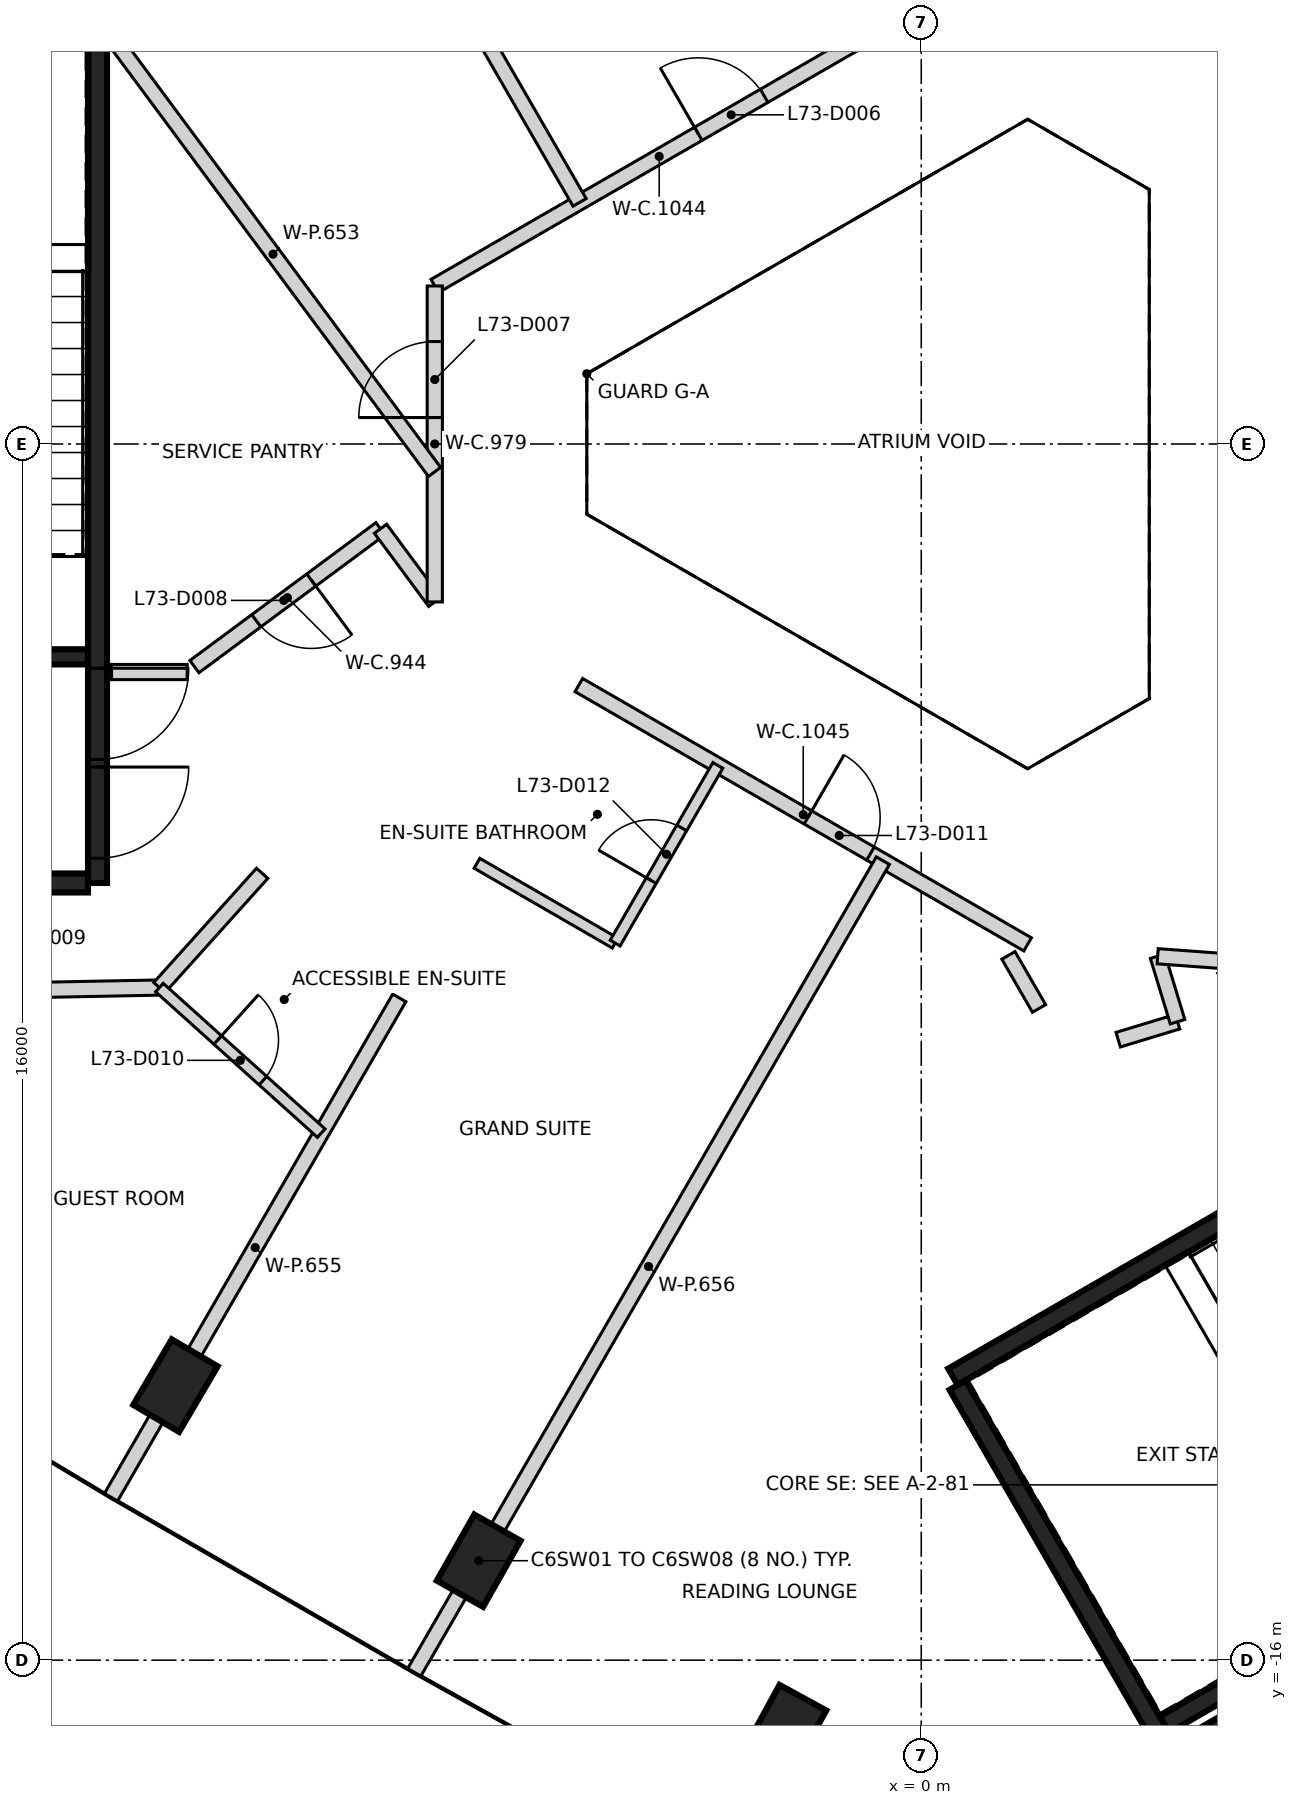
"""IFC4 building model, lengths in metres.
Left out: names, types, materials, properties, quantities, classifications, styles, units other than length and angle.
Written with IfcOpenShell. Run it as: python <this file> out.ifc"""

import sys

from ifc_helpers import new_model, si_unit, direction, frame, frame_2d, origin, origin_2d, place, context, subcontext, project, spatial, rectangle, extrude, element, fill, save


model = new_model("IFC4")
c1 = context("Model", 3, precision=1e-05, world=origin(), true_north=direction((0.0, 1.0)))
c2 = subcontext(c1, "Body", "Model", "MODEL_VIEW")
j1 = project(units=[si_unit("LENGTHUNIT", "METRE"), si_unit("PLANEANGLEUNIT", "RADIAN")], contexts=[c1])
p1 = place(None, origin())
s1 = spatial("IfcSite", under=j1, at=p1, CompositionType="ELEMENT")
p2 = place(p1, origin())
s2 = spatial("IfcBuilding", under=s1, at=p2, CompositionType="ELEMENT")
p3 = place(p2, frame((0.0, 0.0, 291.0)))
s3 = spatial("IfcBuildingStorey", under=s2, at=p3, CompositionType="ELEMENT", Elevation=291.0)
for number, where, z_axis, x_axis in (
    (1, (-9.812, -12.388, -0.35), (0.0, 0.0, 1.0), (0.507, 0.862, 0.0)),
    (2, (-5.822, -14.691, -0.35), (0.0, 0.0, 1.0), (0.493, 0.87, 0.0)),
    (3, (-1.797, -16.932, -0.35), (0.0, 0.0, 1.0), (0.479, 0.878, 0.0)),
):
    element("IfcColumn", number, at=place(p3, frame(where, z_axis=z_axis, x_axis=x_axis)), inside=s3, PredefinedType="COLUMN", context=c2, shape_type="SweptSolid", body=[
        extrude(rectangle(XDim=1.0, YDim=0.7, at=origin_2d()), origin(), (0.0, 0.0, 1.0), 3.6),
    ])
p4 = place(p3, frame((-10.837, 5.775, 0.0), z_axis=(0.0, 0.0, 1.0), x_axis=(0.0, -1.0, 0.0)))
e4 = element("IfcWall", 4, at=p4, inside=s3, PredefinedType="SHEAR", context=c2, shape_type="SweptSolid", body=[
    extrude(rectangle(XDim=11.55, YDim=0.25, at=frame_2d((5.775, 0.0))), origin(), (0.0, 0.0, 1.0), 3.25),
])
p5 = place(p4, frame((10.025, 0.0, 0.0)))
e5 = element("IfcOpeningElement", 5, at=p5, cuts=e4, PredefinedType="OPENING", context=c2, shape_type="SweptSolid", body=[
    extrude(rectangle(XDim=1.2, YDim=2.1, at=frame_2d((0.6, 1.05))), frame((0.0, 0.135, 0.0), z_axis=(0.0, -1.0, 0.0), x_axis=(1.0, 0.0, 0.0)), (0.0, 0.0, 1.0), 0.27),
])
p6 = place(p4, frame((8.725, 0.0, 0.0)))
e6 = element("IfcOpeningElement", 6, at=p6, cuts=e4, PredefinedType="OPENING", context=c2, shape_type="SweptSolid", body=[
    extrude(rectangle(XDim=1.2, YDim=2.1, at=frame_2d((0.6, 1.05))), frame((0.0, 0.135, 0.0), z_axis=(0.0, -1.0, 0.0), x_axis=(1.0, 0.0, 0.0)), (0.0, 0.0, 1.0), 0.27),
])
p7 = place(p3, frame((-10.963, -5.775, 0.0), z_axis=(0.0, 0.0, 1.0), x_axis=(-1.0, 0.0, 0.0)))
e7 = element("IfcWall", 7, at=p7, inside=s3, PredefinedType="SHEAR", context=c2, shape_type="SweptSolid", body=[
    extrude(rectangle(XDim=5.225, YDim=0.25, at=frame_2d((2.612, 0.0))), origin(), (0.0, 0.0, 1.0), 3.25),
])
p8 = place(p3, frame((-10.963, -2.8, 0.0), z_axis=(0.0, 0.0, 1.0), x_axis=(-1.0, 0.0, 0.0)))
e8 = element("IfcWall", 8, at=p8, inside=s3, PredefinedType="SHEAR", context=c2, shape_type="SweptSolid", body=[
    extrude(rectangle(XDim=5.098, YDim=0.2, at=frame_2d((2.549, 0.0))), origin(), (0.0, 0.0, 1.0), 3.25),
])
p9 = place(p8, frame((1.774, 0.0, 0.0)))
e9 = element("IfcOpeningElement", 9, at=p9, cuts=e8, PredefinedType="OPENING", context=c2, shape_type="SweptSolid", body=[
    extrude(rectangle(XDim=1.4, YDim=2.1, at=frame_2d((0.7, 1.05))), frame((0.0, 0.11, 0.0), z_axis=(0.0, -1.0, 0.0), x_axis=(1.0, 0.0, 0.0)), (0.0, 0.0, 1.0), 0.22),
])
p10 = place(p3, frame((0.417, -12.273, 0.0), z_axis=(0.0, 0.0, 1.0), x_axis=(0.866021906294, 0.500006057782, 0.0)))
e10 = element("IfcWall", 10, at=p10, inside=s3, PredefinedType="SHEAR", context=c2, shape_type="SweptSolid", body=[
    extrude(rectangle(XDim=11.55, YDim=0.25, at=frame_2d((5.775, 0.0))), origin(), (0.0, 0.0, 1.0), 3.25),
])
p11 = place(p10, frame((10.025, 0.0, 0.0)))
e11 = element("IfcOpeningElement", 11, at=p11, cuts=e10, PredefinedType="OPENING", context=c2, shape_type="SweptSolid", body=[
    extrude(rectangle(XDim=1.2, YDim=2.1, at=frame_2d((0.6, 1.05))), frame((0.0, 0.135, 0.0), z_axis=(0.0, -1.0, 0.0), x_axis=(1.0, 0.0, 0.0)), (0.0, 0.0, 1.0), 0.27),
])
p12 = place(p10, frame((8.725, 0.0, 0.0)))
e12 = element("IfcOpeningElement", 12, at=p12, cuts=e10, PredefinedType="OPENING", context=c2, shape_type="SweptSolid", body=[
    extrude(rectangle(XDim=1.2, YDim=2.1, at=frame_2d((0.6, 1.05))), frame((0.0, 0.135, 0.0), z_axis=(0.0, -1.0, 0.0), x_axis=(1.0, 0.0, 0.0)), (0.0, 0.0, 1.0), 0.27),
])
p13 = place(p3, frame((3.235, -17.153, 0.0), z_axis=(0.0, 0.0, 1.0), x_axis=(-0.500008851346, 0.866020293397, 0.0)))
e13 = element("IfcWall", 13, at=p13, inside=s3, PredefinedType="SHEAR", context=c2, shape_type="SweptSolid", body=[
    extrude(rectangle(XDim=5.51, YDim=0.25, at=frame_2d((2.755, 0.0))), origin(), (0.0, 0.0, 1.0), 3.25),
])
p14 = place(p3, frame((1.669, -18.19, 0.0), z_axis=(0.0, 0.0, 1.0), x_axis=(0.866042235819, 0.499970844928, 0.0)))
e14 = element("IfcWall", 14, at=p14, inside=s3, PredefinedType="SHEAR", context=c2, shape_type="SweptSolid", body=[
    extrude(rectangle(XDim=2.865, YDim=0.25, at=frame_2d((1.432, 0.0))), origin(), (0.0, 0.0, 1.0), 3.25),
])
p15 = place(p3, frame((5.431, -15.556, 0.0), z_axis=(0.0, 0.0, 1.0), x_axis=(-0.866022940537, -0.500004266446, 0.0)))
e15 = element("IfcWall", 15, at=p15, inside=s3, PredefinedType="SHEAR", context=c2, shape_type="SweptSolid", body=[
    extrude(rectangle(XDim=2.575, YDim=0.25, at=frame_2d((1.287, 0.0))), origin(), (0.0, 0.0, 1.0), 3.25),
])
p16 = place(p3, frame((-16.732, -7.282, 0.0), z_axis=(0.0, 0.0, 1.0), x_axis=(0.999809119854, 0.019537754635, 0.0)))
e16 = element("IfcWall", 16, at=p16, inside=s3, PredefinedType="PARTITIONING", context=c2, shape_type="SweptSolid", body=[
    extrude(rectangle(XDim=6.71, YDim=0.2, at=frame_2d((3.355, 0.0))), origin(), (0.0, 0.0, 1.0), 3.25),
])
p17 = place(p16, frame((3.451, 0.0, 0.0)))
e17 = element("IfcOpeningElement", 17, at=p17, cuts=e16, PredefinedType="OPENING", context=c2, shape_type="SweptSolid", body=[
    extrude(rectangle(XDim=1.0, YDim=2.1, at=frame_2d((0.5, 1.05))), frame((0.0, 0.11, 0.0), z_axis=(0.0, -1.0, 0.0), x_axis=(1.0, 0.0, 0.0)), (0.0, 0.0, 1.0), 0.22),
])
p18 = place(p3, frame((-10.652, -3.0, 0.0), z_axis=(0.0, 0.0, 1.0), x_axis=(1.0, 0.0, 0.0)))
e18 = element("IfcWall", 18, at=p18, inside=s3, PredefinedType="PARTITIONING", context=c2, shape_type="SweptSolid", body=[
    extrude(rectangle(XDim=0.994, YDim=0.2, at=frame_2d((0.497, 0.0))), origin(), (0.0, 0.0, 1.0), 3.25),
])
p19 = place(p3, frame((-10.023, -7.151, 0.0), z_axis=(0.0, 0.0, 1.0), x_axis=(0.668804583793, 0.743438248073, 0.0)))
e19 = element("IfcWall", 19, at=p19, inside=s3, PredefinedType="PARTITIONING", context=c2, shape_type="SweptSolid", body=[
    extrude(rectangle(XDim=2.021, YDim=0.2, at=frame_2d((1.011, 0.0))), origin(), (0.0, 0.0, 1.0), 3.25),
])
p20 = place(p3, frame((-7.115, -1.115, 0.0), z_axis=(0.0, 0.0, 1.0), x_axis=(-0.803344165632, -0.595515030495, 0.0)))
e20 = element("IfcWall", 20, at=p20, inside=s3, PredefinedType="PARTITIONING", context=c2, shape_type="SweptSolid", body=[
    extrude(rectangle(XDim=3.046, YDim=0.2, at=frame_2d((1.523, 0.0))), origin(), (0.0, 0.0, 1.0), 3.25),
])
p21 = place(p20, frame((1.133, 0.0, 0.0)))
e21 = element("IfcOpeningElement", 21, at=p21, cuts=e20, PredefinedType="OPENING", context=c2, shape_type="SweptSolid", body=[
    extrude(rectangle(XDim=0.9, YDim=2.1, at=frame_2d((0.45, 1.05))), frame((0.0, 0.11, 0.0), z_axis=(0.0, -1.0, 0.0), x_axis=(1.0, 0.0, 0.0)), (0.0, 0.0, 1.0), 0.22),
])
p22 = place(p3, frame((-7.114, -1.115, 0.0), z_axis=(0.0, 0.0, 1.0), x_axis=(0.595690139668, -0.803214328496, 0.0)))
e22 = element("IfcWall", 22, at=p22, inside=s3, PredefinedType="PARTITIONING", context=c2, shape_type="SweptSolid", body=[
    extrude(rectangle(XDim=1.199, YDim=0.2, at=frame_2d((0.599, 0.0))), origin(), (0.0, 0.0, 1.0), 3.25),
])
p23 = place(p3, frame((-6.4, 2.079, 0.0), z_axis=(0.0, 0.0, 1.0), x_axis=(0.866037708501, 0.499978687001, 0.0)))
e23 = element("IfcWall", 23, at=p23, inside=s3, PredefinedType="PARTITIONING", context=c2, shape_type="SweptSolid", body=[
    extrude(rectangle(XDim=6.818, YDim=0.2, at=frame_2d((3.409, 0.0))), origin(), (0.0, 0.0, 1.0), 3.25),
])
p24 = place(p23, frame((4.003, 0.0, 0.0)))
e24 = element("IfcOpeningElement", 24, at=p24, cuts=e23, PredefinedType="OPENING", context=c2, shape_type="SweptSolid", body=[
    extrude(rectangle(XDim=1.0, YDim=2.1, at=frame_2d((0.5, 1.05))), frame((0.0, 0.11, 0.0), z_axis=(0.0, -1.0, 0.0), x_axis=(1.0, 0.0, 0.0)), (0.0, 0.0, 1.0), 0.22),
])
p25 = place(p3, frame((-6.4, -2.078, 0.0), z_axis=(0.0, 0.0, 1.0), x_axis=(0.0, 1.0, 0.0)))
e25 = element("IfcWall", 25, at=p25, inside=s3, PredefinedType="PARTITIONING", context=c2, shape_type="SweptSolid", body=[
    extrude(rectangle(XDim=4.157, YDim=0.2, at=frame_2d((2.079, 0.0))), origin(), (0.0, 0.0, 1.0), 3.25),
])
p26 = place(p25, frame((2.426, 0.0, 0.0)))
e26 = element("IfcOpeningElement", 26, at=p26, cuts=e25, PredefinedType="OPENING", context=c2, shape_type="SweptSolid", body=[
    extrude(rectangle(XDim=1.0, YDim=2.1, at=frame_2d((0.5, 1.05))), frame((0.0, 0.11, 0.0), z_axis=(0.0, -1.0, 0.0), x_axis=(1.0, 0.0, 0.0)), (0.0, 0.0, 1.0), 0.22),
])
p27 = place(p3, frame((-4.505, -3.171, 0.0), z_axis=(0.0, 0.0, 1.0), x_axis=(0.865849219471, -0.500305036094, 0.0)))
e27 = element("IfcWall", 27, at=p27, inside=s3, PredefinedType="PARTITIONING", context=c2, shape_type="SweptSolid", body=[
    extrude(rectangle(XDim=6.819, YDim=0.2, at=frame_2d((3.41, 0.0))), origin(), (0.0, 0.0, 1.0), 3.25),
])
p28 = place(p27, frame((3.481, 0.0, 0.0)))
e28 = element("IfcOpeningElement", 28, at=p28, cuts=e27, PredefinedType="OPENING", context=c2, shape_type="SweptSolid", body=[
    extrude(rectangle(XDim=0.95, YDim=2.1, at=frame_2d((0.475, 1.05))), frame((0.0, 0.11, 0.0), z_axis=(0.0, -1.0, 0.0), x_axis=(1.0, 0.0, 0.0)), (0.0, 0.0, 1.0), 0.22),
])
p29 = place(p3, frame((1.147, -6.728, 0.0), z_axis=(0.0, 0.0, 1.0), x_axis=(0.500080775649, -0.865978762919, 0.0)))
e29 = element("IfcWall", 29, at=p29, inside=s3, PredefinedType="PARTITIONING", context=c2, shape_type="SweptSolid", body=[
    extrude(rectangle(XDim=0.806, YDim=0.2, at=frame_2d((0.403, 0.0))), origin(), (0.0, 0.0, 1.0), 3.25),
])
p30 = place(p3, frame((2.591, -7.837, 0.0), z_axis=(0.0, 0.0, 1.0), x_axis=(0.956974070788, 0.290173444409, 0.0)))
e30 = element("IfcWall", 30, at=p30, inside=s3, PredefinedType="PARTITIONING", context=c2, shape_type="SweptSolid", body=[
    extrude(rectangle(XDim=0.816, YDim=0.2, at=frame_2d((0.408, 0.0))), origin(), (0.0, 0.0, 1.0), 3.25),
])
p31 = place(p3, frame((3.11, -6.739, 0.0), z_axis=(0.0, 0.0, 1.0), x_axis=(0.291053676179, -0.95670672496, 0.0)))
e31 = element("IfcWall", 31, at=p31, inside=s3, PredefinedType="PARTITIONING", context=c2, shape_type="SweptSolid", body=[
    extrude(rectangle(XDim=0.9, YDim=0.2, at=frame_2d((0.45, 0.0))), origin(), (0.0, 0.0, 1.0), 3.25),
])
p32 = place(p3, frame((3.11, -6.739, 0.0), z_axis=(0.0, 0.0, 1.0), x_axis=(0.997306047238, -0.073352901386, 0.0)))
e32 = element("IfcWall", 32, at=p32, inside=s3, PredefinedType="PARTITIONING", context=c2, shape_type="SweptSolid", body=[
    extrude(rectangle(XDim=0.832, YDim=0.2, at=frame_2d((0.416, 0.0))), origin(), (0.0, 0.0, 1.0), 3.25),
])
p33 = place(p3, frame((-10.652, 5.364, 0.0), z_axis=(0.0, 0.0, 1.0), x_axis=(0.595550732464, -0.803317698711, 0.0)))
e33 = element("IfcWall", 33, at=p33, inside=s3, PredefinedType="PARTITIONING", context=c2, shape_type="SweptSolid", body=[
    extrude(rectangle(XDim=7.135, YDim=0.2, at=frame_2d((3.567, 0.0))), origin(), (0.0, 0.0, 1.0), 3.25),
])
p34 = place(p3, frame((-10.659, 13.856, 0.0), z_axis=(0.0, 0.0, 1.0), x_axis=(0.500004723409, -0.866022676706, 0.0)))
e34 = element("IfcWall", 34, at=p34, inside=s3, PredefinedType="PARTITIONING", context=c2, shape_type="SweptSolid", body=[
    extrude(rectangle(XDim=12.329, YDim=0.2, at=frame_2d((6.164, 0.0))), origin(), (0.0, 0.0, 1.0), 3.25),
])
p35 = place(p3, frame((-10.659, -13.856, 0.0), z_axis=(0.0, 0.0, 1.0), x_axis=(0.49995742368, 0.866049983839, 0.0)))
e35 = element("IfcWall", 35, at=p35, inside=s3, PredefinedType="PARTITIONING", context=c2, shape_type="SweptSolid", body=[
    extrude(rectangle(XDim=7.585, YDim=0.2, at=frame_2d((3.792, 0.0))), origin(), (0.0, 0.0, 1.0), 3.25),
])
p36 = place(p3, frame((-6.67, -16.159, 0.0), z_axis=(0.0, 0.0, 1.0), x_axis=(0.500017276951, 0.866015428702, 0.0)))
e36 = element("IfcWall", 36, at=p36, inside=s3, PredefinedType="PARTITIONING", context=c2, shape_type="SweptSolid", body=[
    extrude(rectangle(XDim=12.329, YDim=0.2, at=frame_2d((6.165, 0.0))), origin(), (0.0, 0.0, 1.0), 3.25),
])
p37 = place(p3, frame((-10.023, -7.151, 0.0), z_axis=(0.0, 0.0, 1.0), x_axis=(0.743463699468, -0.668776291127, 0.0)))
e37 = element("IfcWall", 37, at=p37, inside=s3, PredefinedType="PARTITIONING", context=c2, shape_type="SweptSolid", body=[
    extrude(rectangle(XDim=2.864, YDim=0.15, at=frame_2d((1.432, 0.0))), origin(), (0.0, 0.0, 1.0), 3.25),
])
p38 = place(p37, frame((1.032, 0.0, 0.0)))
e38 = element("IfcOpeningElement", 38, at=p38, cuts=e37, PredefinedType="OPENING", context=c2, shape_type="SweptSolid", body=[
    extrude(rectangle(XDim=0.8, YDim=2.1, at=frame_2d((0.4, 1.05))), frame((0.0, 0.085, 0.0), z_axis=(0.0, -1.0, 0.0), x_axis=(1.0, 0.0, 0.0)), (0.0, 0.0, 1.0), 0.17),
])
p39 = place(p3, frame((-5.845, -5.516, 0.0), z_axis=(0.0, 0.0, 1.0), x_axis=(0.865972526687, -0.500091574638, 0.0)))
e39 = element("IfcWall", 39, at=p39, inside=s3, PredefinedType="PARTITIONING", context=c2, shape_type="SweptSolid", body=[
    extrude(rectangle(XDim=2.099, YDim=0.15, at=frame_2d((1.05, 0.0))), origin(), (0.0, 0.0, 1.0), 3.25),
])
p40 = place(p3, frame((-4.027, -6.566, 0.0), z_axis=(0.0, 0.0, 1.0), x_axis=(0.500358939419, 0.865818070812, 0.0)))
e40 = element("IfcWall", 40, at=p40, inside=s3, PredefinedType="PARTITIONING", context=c2, shape_type="SweptSolid", body=[
    extrude(rectangle(XDim=2.7, YDim=0.15, at=frame_2d((1.35, 0.0))), origin(), (0.0, 0.0, 1.0), 3.25),
])
p41 = place(p40, frame((0.95, 0.0, 0.0)))
e41 = element("IfcOpeningElement", 41, at=p41, cuts=e40, PredefinedType="OPENING", context=c2, shape_type="SweptSolid", body=[
    extrude(rectangle(XDim=0.8, YDim=2.1, at=frame_2d((0.4, 1.05))), frame((0.0, 0.085, 0.0), z_axis=(0.0, -1.0, 0.0), x_axis=(1.0, 0.0, 0.0)), (0.0, 0.0, 1.0), 0.17),
])
p42 = place(p5, origin())
e42 = element("IfcDoor", 42, at=p42, inside=s3, OperationType="SINGLE_SWING_LEFT", PredefinedType="DOOR", context=c2, shape_type="SweptSolid", body=[
    extrude(rectangle(XDim=1.2, YDim=2.1, at=frame_2d((0.6, 1.05))), frame((0.0, 0.025, 0.0), z_axis=(0.0, -1.0, 0.0), x_axis=(1.0, 0.0, 0.0)), (0.0, 0.0, 1.0), 0.05),
])
fill(e5, e42)
p43 = place(p6, origin())
e43 = element("IfcDoor", 43, at=p43, inside=s3, OperationType="SINGLE_SWING_RIGHT", PredefinedType="DOOR", context=c2, shape_type="SweptSolid", body=[
    extrude(rectangle(XDim=1.2, YDim=2.1, at=frame_2d((0.6, 1.05))), frame((0.0, 0.025, 0.0), z_axis=(0.0, -1.0, 0.0), x_axis=(1.0, 0.0, 0.0)), (0.0, 0.0, 1.0), 0.05),
])
fill(e6, e43)
p44 = place(p24, origin())
e44 = element("IfcDoor", 44, at=p44, inside=s3, OperationType="SINGLE_SWING_LEFT", PredefinedType="DOOR", context=c2, shape_type="SweptSolid", body=[
    extrude(rectangle(XDim=1.0, YDim=2.1, at=frame_2d((0.5, 1.05))), frame((0.0, 0.025, 0.0), z_axis=(0.0, -1.0, 0.0), x_axis=(1.0, 0.0, 0.0)), (0.0, 0.0, 1.0), 0.05),
])
fill(e24, e44)
p45 = place(p26, origin())
e45 = element("IfcDoor", 45, at=p45, inside=s3, OperationType="SINGLE_SWING_LEFT", PredefinedType="DOOR", context=c2, shape_type="SweptSolid", body=[
    extrude(rectangle(XDim=1.0, YDim=2.1, at=frame_2d((0.5, 1.05))), frame((0.0, 0.025, 0.0), z_axis=(0.0, -1.0, 0.0), x_axis=(1.0, 0.0, 0.0)), (0.0, 0.0, 1.0), 0.05),
])
fill(e26, e45)
p46 = place(p21, origin())
e46 = element("IfcDoor", 46, at=p46, inside=s3, OperationType="SINGLE_SWING_LEFT", PredefinedType="DOOR", context=c2, shape_type="SweptSolid", body=[
    extrude(rectangle(XDim=0.9, YDim=2.1, at=frame_2d((0.45, 1.05))), frame((0.0, 0.025, 0.0), z_axis=(0.0, -1.0, 0.0), x_axis=(1.0, 0.0, 0.0)), (0.0, 0.0, 1.0), 0.05),
])
fill(e21, e46)
p47 = place(p38, frame((0.8, 0.0, 0.0), z_axis=(0.0, 0.0, 1.0), x_axis=(-1.0, 0.0, 0.0)))
e47 = element("IfcDoor", 47, at=p47, inside=s3, OperationType="SINGLE_SWING_LEFT", PredefinedType="DOOR", context=c2, shape_type="SweptSolid", body=[
    extrude(rectangle(XDim=0.8, YDim=2.1, at=frame_2d((0.4, 1.05))), frame((0.0, 0.025, 0.0), z_axis=(0.0, -1.0, 0.0), x_axis=(1.0, 0.0, 0.0)), (0.0, 0.0, 1.0), 0.05),
])
fill(e38, e47)
p48 = place(p28, frame((0.95, 0.0, 0.0), z_axis=(0.0, 0.0, 1.0), x_axis=(-1.0, 0.0, 0.0)))
e48 = element("IfcDoor", 48, at=p48, inside=s3, OperationType="SINGLE_SWING_LEFT", PredefinedType="DOOR", context=c2, shape_type="SweptSolid", body=[
    extrude(rectangle(XDim=0.95, YDim=2.1, at=frame_2d((0.475, 1.05))), frame((0.0, 0.025, 0.0), z_axis=(0.0, -1.0, 0.0), x_axis=(1.0, 0.0, 0.0)), (0.0, 0.0, 1.0), 0.05),
])
fill(e28, e48)
p49 = place(p41, frame((0.8, 0.0, 0.0), z_axis=(0.0, 0.0, 1.0), x_axis=(-1.0, 0.0, 0.0)))
e49 = element("IfcDoor", 49, at=p49, inside=s3, OperationType="SINGLE_SWING_LEFT", PredefinedType="DOOR", context=c2, shape_type="SweptSolid", body=[
    extrude(rectangle(XDim=0.8, YDim=2.1, at=frame_2d((0.4, 1.05))), frame((0.0, 0.025, 0.0), z_axis=(0.0, -1.0, 0.0), x_axis=(1.0, 0.0, 0.0)), (0.0, 0.0, 1.0), 0.05),
])
fill(e41, e49)
save(model, sys.argv[1])
